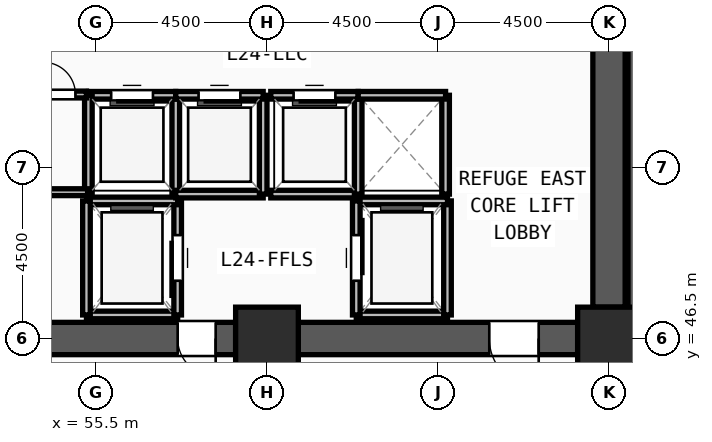
"""IFC4 building model, lengths in metres.
Left out: names, types, materials, properties, quantities, classifications, styles, units other than length and angle.
Written with IfcOpenShell. Run it as: python <this file> out.ifc"""

import sys

from ifc_helpers import new_model, si_unit, direction, frame, frame_2d, origin, origin_2d, place, context, subcontext, project, spatial, rectangle, extrude, source, transform, mapped, element, fill, save


model = new_model("IFC4")
c1 = context("Model", 3, precision=1e-05, world=origin(), true_north=direction((0.0, 1.0)))
c2 = subcontext(c1, "Body", "Model", "MODEL_VIEW")
j1 = project(units=[si_unit("LENGTHUNIT", "METRE"), si_unit("PLANEANGLEUNIT", "RADIAN")], contexts=[c1])
p1 = place(None, origin())
s1 = spatial("IfcSite", under=j1, at=p1, CompositionType="ELEMENT")
p2 = place(p1, origin())
s2 = spatial("IfcBuilding", under=s1, at=p2, CompositionType="ELEMENT")
p3 = place(p2, frame((0.0, 0.0, 93.0)))
s3 = spatial("IfcBuildingStorey", under=s2, at=p3, CompositionType="ELEMENT", Elevation=93.0)
m1 = source(origin(), c2, "Body", "SweptSolid", [
    extrude(rectangle(XDim=1.65, YDim=1.65, at=origin_2d()), origin(), (0.0, 0.0, 1.0), 4.5),
])
for number, where, z_axis, x_axis in (
    (1, (60.0, 46.5, 0.0), (0.0, 0.0, 1.0), (1.0, 0.0, 0.0)),
    (2, (69.0, 46.5, 0.0), (0.0, 0.0, 1.0), (1.0, 0.0, 0.0)),
):
    element("IfcColumn", number, at=place(p3, frame(where, z_axis=z_axis, x_axis=x_axis)), inside=s3, PredefinedType="COLUMN", context=c2, shape_type="MappedRepresentation", body=[
        mapped(m1, transform((0.0, 0.0, 0.0), x_axis=(1.0, 0.0, 0.0), y_axis=(0.0, 1.0, 0.0), z_axis=(0.0, 0.0, 1.0), scale=1.0)),
    ])
p4 = place(p3, frame((69.0, 60.675, 0.0), z_axis=(0.0, 0.0, 1.0), x_axis=(0.0, -1.0, 0.0)))
e3 = element("IfcWall", 3, at=p4, inside=s3, PredefinedType="SHEAR", context=c2, shape_type="SweptSolid", body=[
    extrude(rectangle(XDim=13.35, YDim=0.85, at=frame_2d((6.675, 0.0))), origin(), (0.0, 0.0, 1.0), 4.22),
])
m2 = source(origin(), c2, "Body", "SweptSolid", [
    extrude(rectangle(XDim=1.2, YDim=2.2, at=frame_2d((0.6, 1.1))), frame((0.0, 0.435, 0.0), z_axis=(0.0, -1.0, 0.0), x_axis=(1.0, 0.0, 0.0)), (0.0, 0.0, 1.0), 0.87),
])
p5 = place(p4, frame((1.125, 0.0, 0.0)))
e4 = element("IfcOpeningElement", 4, at=p5, cuts=e3, PredefinedType="OPENING", context=c2, shape_type="MappedRepresentation", body=[
    mapped(m2, transform((0.0, 0.0, 0.0), x_axis=(1.0, 0.0, 0.0), y_axis=(0.0, 1.0, 0.0), z_axis=(0.0, 0.0, 1.0), scale=1.0)),
])
p6 = place(p3, frame((68.175, 46.5, 0.0), z_axis=(0.0, 0.0, 1.0), x_axis=(-1.0, 0.0, 0.0)))
e5 = element("IfcWall", 5, at=p6, inside=s3, PredefinedType="SHEAR", context=c2, shape_type="SweptSolid", body=[
    extrude(rectangle(XDim=7.35, YDim=0.85, at=frame_2d((3.675, 0.0))), origin(), (0.0, 0.0, 1.0), 4.22),
])
m3 = source(origin(), c2, "Body", "SweptSolid", [
    extrude(rectangle(XDim=1.3, YDim=2.2, at=frame_2d((0.65, 1.1))), frame((0.0, 0.435, 0.0), z_axis=(0.0, -1.0, 0.0), x_axis=(1.0, 0.0, 0.0)), (0.0, 0.0, 1.0), 0.87),
])
p7 = place(p6, frame((1.025, 0.0, 0.0)))
e6 = element("IfcOpeningElement", 6, at=p7, cuts=e5, PredefinedType="OPENING", context=c2, shape_type="MappedRepresentation", body=[
    mapped(m3, transform((0.0, 0.0, 0.0), x_axis=(1.0, 0.0, 0.0), y_axis=(0.0, 1.0, 0.0), z_axis=(0.0, 0.0, 1.0), scale=1.0)),
])
p8 = place(p3, frame((59.175, 46.5, 0.0), z_axis=(0.0, 0.0, 1.0), x_axis=(-1.0, 0.0, 0.0)))
e7 = element("IfcWall", 7, at=p8, inside=s3, PredefinedType="SHEAR", context=c2, shape_type="SweptSolid", body=[
    extrude(rectangle(XDim=7.35, YDim=0.85, at=frame_2d((3.675, 0.0))), origin(), (0.0, 0.0, 1.0), 4.22),
])
p9 = place(p8, frame((5.025, 0.0, 0.0)))
e8 = element("IfcOpeningElement", 8, at=p9, cuts=e7, PredefinedType="OPENING", context=c2, shape_type="MappedRepresentation", body=[
    mapped(m3, transform((0.0, 0.0, 0.0), x_axis=(1.0, 0.0, 0.0), y_axis=(0.0, 1.0, 0.0), z_axis=(0.0, 0.0, 1.0), scale=1.0)),
])
m4 = source(origin(), c2, "Body", "SweptSolid", [
    extrude(rectangle(XDim=1.0, YDim=2.2, at=frame_2d((0.5, 1.1))), frame((0.0, 0.435, 0.0), z_axis=(0.0, -1.0, 0.0), x_axis=(1.0, 0.0, 0.0)), (0.0, 0.0, 1.0), 0.87),
])
p10 = place(p8, frame((0.525, 0.0, 0.0)))
e9 = element("IfcOpeningElement", 9, at=p10, cuts=e7, PredefinedType="OPENING", context=c2, shape_type="MappedRepresentation", body=[
    mapped(m4, transform((0.0, 0.0, 0.0), x_axis=(1.0, 0.0, 0.0), y_axis=(0.0, 1.0, 0.0), z_axis=(0.0, 0.0, 1.0), scale=1.0)),
])
p11 = place(p3, frame((69.62, 54.52, 0.0), z_axis=(0.0, 0.0, 1.0), x_axis=(0.0, -1.0, 0.0)))
e10 = element("IfcWall", 10, at=p11, inside=s3, PredefinedType="SOLIDWALL", context=c2, shape_type="SweptSolid", body=[
    extrude(rectangle(XDim=7.82, YDim=0.24, at=frame_2d((3.91, 0.0))), origin(), (0.0, 0.0, 1.0), 4.22),
])
p12 = place(p3, frame((55.25, 47.12, 0.0), z_axis=(0.0, 0.0, 1.0), x_axis=(1.0, 0.0, 0.0)))
e11 = element("IfcWall", 11, at=p12, inside=s3, PredefinedType="SOLIDWALL", context=c2, shape_type="SweptSolid", body=[
    extrude(rectangle(XDim=2.4, YDim=0.2, at=frame_2d((1.2, 0.0))), origin(), (0.0, 0.0, 1.0), 4.22),
])
p13 = place(p3, frame((57.65, 47.12, 0.0), z_axis=(0.0, 0.0, 1.0), x_axis=(0.0, 1.0, 0.0)))
e12 = element("IfcWall", 12, at=p13, inside=s3, PredefinedType="SOLIDWALL", context=c2, shape_type="SweptSolid", body=[
    extrude(rectangle(XDim=3.0, YDim=0.2, at=frame_2d((1.5, 0.0))), origin(), (0.0, 0.0, 1.0), 4.22),
])
m5 = source(origin(), c2, "Body", "SweptSolid", [
    extrude(rectangle(XDim=1.2, YDim=2.3, at=frame_2d((0.6, 1.15))), frame((0.0, 0.11, 0.0), z_axis=(0.0, -1.0, 0.0), x_axis=(1.0, 0.0, 0.0)), (0.0, 0.0, 1.0), 0.22),
])
p14 = place(p13, frame((0.9, 0.0, 0.0)))
e13 = element("IfcOpeningElement", 13, at=p14, cuts=e12, PredefinedType="OPENING", context=c2, shape_type="MappedRepresentation", body=[
    mapped(m5, transform((0.0, 0.0, 0.0), x_axis=(1.0, 0.0, 0.0), y_axis=(0.0, 1.0, 0.0), z_axis=(0.0, 0.0, 1.0), scale=1.0)),
])
p15 = place(p3, frame((57.65, 50.12, 0.0), z_axis=(0.0, 0.0, 1.0), x_axis=(-1.0, 0.0, 0.0)))
e14 = element("IfcWall", 14, at=p15, inside=s3, PredefinedType="SOLIDWALL", context=c2, shape_type="SweptSolid", body=[
    extrude(rectangle(XDim=2.4, YDim=0.2, at=frame_2d((1.2, 0.0))), origin(), (0.0, 0.0, 1.0), 4.22),
])
p16 = place(p3, frame((55.25, 50.12, 0.0), z_axis=(0.0, 0.0, 1.0), x_axis=(0.0, -1.0, 0.0)))
e15 = element("IfcWall", 15, at=p16, inside=s3, PredefinedType="SOLIDWALL", context=c2, shape_type="SweptSolid", body=[
    extrude(rectangle(XDim=3.0, YDim=0.2, at=frame_2d((1.5, 0.0))), origin(), (0.0, 0.0, 1.0), 4.22),
])
p17 = place(p3, frame((62.35, 47.12, 0.0), z_axis=(0.0, 0.0, 1.0), x_axis=(1.0, 0.0, 0.0)))
e16 = element("IfcWall", 16, at=p17, inside=s3, PredefinedType="SOLIDWALL", context=c2, shape_type="SweptSolid", body=[
    extrude(rectangle(XDim=2.4, YDim=0.2, at=frame_2d((1.2, 0.0))), origin(), (0.0, 0.0, 1.0), 4.22),
])
p18 = place(p3, frame((64.75, 47.12, 0.0), z_axis=(0.0, 0.0, 1.0), x_axis=(0.0, 1.0, 0.0)))
e17 = element("IfcWall", 17, at=p18, inside=s3, PredefinedType="SOLIDWALL", context=c2, shape_type="SweptSolid", body=[
    extrude(rectangle(XDim=3.0, YDim=0.2, at=frame_2d((1.5, 0.0))), origin(), (0.0, 0.0, 1.0), 4.22),
])
p19 = place(p3, frame((64.75, 50.12, 0.0), z_axis=(0.0, 0.0, 1.0), x_axis=(-1.0, 0.0, 0.0)))
e18 = element("IfcWall", 18, at=p19, inside=s3, PredefinedType="SOLIDWALL", context=c2, shape_type="SweptSolid", body=[
    extrude(rectangle(XDim=2.4, YDim=0.2, at=frame_2d((1.2, 0.0))), origin(), (0.0, 0.0, 1.0), 4.22),
])
p20 = place(p3, frame((62.35, 50.12, 0.0), z_axis=(0.0, 0.0, 1.0), x_axis=(0.0, -1.0, 0.0)))
e19 = element("IfcWall", 19, at=p20, inside=s3, PredefinedType="SOLIDWALL", context=c2, shape_type="SweptSolid", body=[
    extrude(rectangle(XDim=3.0, YDim=0.2, at=frame_2d((1.5, 0.0))), origin(), (0.0, 0.0, 1.0), 4.22),
])
p21 = place(p20, frame((0.9, 0.0, 0.0)))
e20 = element("IfcOpeningElement", 20, at=p21, cuts=e19, PredefinedType="OPENING", context=c2, shape_type="MappedRepresentation", body=[
    mapped(m5, transform((0.0, 0.0, 0.0), x_axis=(1.0, 0.0, 0.0), y_axis=(0.0, 1.0, 0.0), z_axis=(0.0, 0.0, 1.0), scale=1.0)),
])
p22 = place(p3, frame((57.6, 50.3, 0.0), z_axis=(0.0, 0.0, 1.0), x_axis=(0.0, 1.0, 0.0)))
e21 = element("IfcWall", 21, at=p22, inside=s3, PredefinedType="SOLIDWALL", context=c2, shape_type="SweptSolid", body=[
    extrude(rectangle(XDim=2.6, YDim=0.2, at=frame_2d((1.3, 0.0))), origin(), (0.0, 0.0, 1.0), 4.22),
])
p23 = place(p3, frame((57.6, 52.9, 0.0), z_axis=(0.0, 0.0, 1.0), x_axis=(-1.0, 0.0, 0.0)))
e22 = element("IfcWall", 22, at=p23, inside=s3, PredefinedType="SOLIDWALL", context=c2, shape_type="SweptSolid", body=[
    extrude(rectangle(XDim=2.3, YDim=0.2, at=frame_2d((1.15, 0.0))), origin(), (0.0, 0.0, 1.0), 4.22),
])
m6 = source(origin(), c2, "Body", "SweptSolid", [
    extrude(rectangle(XDim=1.1, YDim=2.2, at=frame_2d((0.55, 1.1))), frame((0.0, 0.11, 0.0), z_axis=(0.0, -1.0, 0.0), x_axis=(1.0, 0.0, 0.0)), (0.0, 0.0, 1.0), 0.22),
])
p24 = place(p23, frame((0.6, 0.0, 0.0)))
e23 = element("IfcOpeningElement", 23, at=p24, cuts=e22, PredefinedType="OPENING", context=c2, shape_type="MappedRepresentation", body=[
    mapped(m6, transform((0.0, 0.0, 0.0), x_axis=(1.0, 0.0, 0.0), y_axis=(0.0, 1.0, 0.0), z_axis=(0.0, 0.0, 1.0), scale=1.0)),
])
p25 = place(p3, frame((55.3, 52.9, 0.0), z_axis=(0.0, 0.0, 1.0), x_axis=(0.0, -1.0, 0.0)))
e24 = element("IfcWall", 24, at=p25, inside=s3, PredefinedType="SOLIDWALL", context=c2, shape_type="SweptSolid", body=[
    extrude(rectangle(XDim=2.6, YDim=0.2, at=frame_2d((1.3, 0.0))), origin(), (0.0, 0.0, 1.0), 4.22),
])
p26 = place(p3, frame((57.6, 50.3, 0.0), z_axis=(0.0, 0.0, 1.0), x_axis=(1.0, 0.0, 0.0)))
e25 = element("IfcWall", 25, at=p26, inside=s3, PredefinedType="SOLIDWALL", context=c2, shape_type="SweptSolid", body=[
    extrude(rectangle(XDim=2.3, YDim=0.2, at=frame_2d((1.15, 0.0))), origin(), (0.0, 0.0, 1.0), 4.22),
])
p27 = place(p3, frame((59.9, 50.3, 0.0), z_axis=(0.0, 0.0, 1.0), x_axis=(0.0, 1.0, 0.0)))
e26 = element("IfcWall", 26, at=p27, inside=s3, PredefinedType="SOLIDWALL", context=c2, shape_type="SweptSolid", body=[
    extrude(rectangle(XDim=2.6, YDim=0.2, at=frame_2d((1.3, 0.0))), origin(), (0.0, 0.0, 1.0), 4.22),
])
p28 = place(p3, frame((59.9, 52.9, 0.0), z_axis=(0.0, 0.0, 1.0), x_axis=(-1.0, 0.0, 0.0)))
e27 = element("IfcWall", 27, at=p28, inside=s3, PredefinedType="SOLIDWALL", context=c2, shape_type="SweptSolid", body=[
    extrude(rectangle(XDim=2.3, YDim=0.2, at=frame_2d((1.15, 0.0))), origin(), (0.0, 0.0, 1.0), 4.22),
])
p29 = place(p28, frame((0.6, 0.0, 0.0)))
e28 = element("IfcOpeningElement", 28, at=p29, cuts=e27, PredefinedType="OPENING", context=c2, shape_type="MappedRepresentation", body=[
    mapped(m6, transform((0.0, 0.0, 0.0), x_axis=(1.0, 0.0, 0.0), y_axis=(0.0, 1.0, 0.0), z_axis=(0.0, 0.0, 1.0), scale=1.0)),
])
p30 = place(p3, frame((60.1, 50.3, 0.0), z_axis=(0.0, 0.0, 1.0), x_axis=(1.0, 0.0, 0.0)))
e29 = element("IfcWall", 29, at=p30, inside=s3, PredefinedType="SOLIDWALL", context=c2, shape_type="SweptSolid", body=[
    extrude(rectangle(XDim=2.3, YDim=0.2, at=frame_2d((1.15, 0.0))), origin(), (0.0, 0.0, 1.0), 4.22),
])
p31 = place(p3, frame((62.4, 50.3, 0.0), z_axis=(0.0, 0.0, 1.0), x_axis=(0.0, 1.0, 0.0)))
e30 = element("IfcWall", 30, at=p31, inside=s3, PredefinedType="SOLIDWALL", context=c2, shape_type="SweptSolid", body=[
    extrude(rectangle(XDim=2.6, YDim=0.2, at=frame_2d((1.3, 0.0))), origin(), (0.0, 0.0, 1.0), 4.22),
])
p32 = place(p3, frame((62.4, 52.9, 0.0), z_axis=(0.0, 0.0, 1.0), x_axis=(-1.0, 0.0, 0.0)))
e31 = element("IfcWall", 31, at=p32, inside=s3, PredefinedType="SOLIDWALL", context=c2, shape_type="SweptSolid", body=[
    extrude(rectangle(XDim=2.3, YDim=0.2, at=frame_2d((1.15, 0.0))), origin(), (0.0, 0.0, 1.0), 4.22),
])
p33 = place(p32, frame((0.6, 0.0, 0.0)))
e32 = element("IfcOpeningElement", 32, at=p33, cuts=e31, PredefinedType="OPENING", context=c2, shape_type="MappedRepresentation", body=[
    mapped(m6, transform((0.0, 0.0, 0.0), x_axis=(1.0, 0.0, 0.0), y_axis=(0.0, 1.0, 0.0), z_axis=(0.0, 0.0, 1.0), scale=1.0)),
])
p34 = place(p3, frame((64.7, 50.3, 0.0), z_axis=(0.0, 0.0, 1.0), x_axis=(0.0, 1.0, 0.0)))
e33 = element("IfcWall", 33, at=p34, inside=s3, PredefinedType="SOLIDWALL", context=c2, shape_type="SweptSolid", body=[
    extrude(rectangle(XDim=2.6, YDim=0.2, at=frame_2d((1.3, 0.0))), origin(), (0.0, 0.0, 1.0), 4.22),
])
p35 = place(p3, frame((64.7, 52.9, 0.0), z_axis=(0.0, 0.0, 1.0), x_axis=(-1.0, 0.0, 0.0)))
e34 = element("IfcWall", 34, at=p35, inside=s3, PredefinedType="SOLIDWALL", context=c2, shape_type="SweptSolid", body=[
    extrude(rectangle(XDim=2.3, YDim=0.2, at=frame_2d((1.15, 0.0))), origin(), (0.0, 0.0, 1.0), 4.22),
])
p36 = place(p3, frame((53.82, 52.92, 0.0), z_axis=(0.0, 0.0, 1.0), x_axis=(1.0, 0.0, 0.0)))
e35 = element("IfcWall", 35, at=p36, inside=s3, PredefinedType="PARTITIONING", context=c2, shape_type="SweptSolid", body=[
    extrude(rectangle(XDim=1.43, YDim=0.18, at=frame_2d((0.715, 0.0))), origin(), (0.0, 0.0, 1.0), 4.22),
])
m7 = source(origin(), c2, "Body", "SweptSolid", [
    extrude(rectangle(XDim=0.85, YDim=2.1, at=frame_2d((0.425, 1.05))), frame((0.0, 0.1, 0.0), z_axis=(0.0, -1.0, 0.0), x_axis=(1.0, 0.0, 0.0)), (0.0, 0.0, 1.0), 0.2),
])
p37 = place(p36, frame((0.29, 0.0, 0.0)))
e36 = element("IfcOpeningElement", 36, at=p37, cuts=e35, PredefinedType="OPENING", context=c2, shape_type="MappedRepresentation", body=[
    mapped(m7, transform((0.0, 0.0, 0.0), x_axis=(1.0, 0.0, 0.0), y_axis=(0.0, 1.0, 0.0), z_axis=(0.0, 0.0, 1.0), scale=1.0)),
])
p38 = place(p3, frame((53.79, 50.35, 0.0), z_axis=(0.0, 0.0, 1.0), x_axis=(1.0, 0.0, 0.0)))
e37 = element("IfcWall", 37, at=p38, inside=s3, PredefinedType="PARTITIONING", context=c2, shape_type="SweptSolid", body=[
    extrude(rectangle(XDim=1.49, YDim=0.18, at=frame_2d((0.745, 0.0))), origin(), (0.0, 0.0, 1.0), 4.22),
])
m8 = source(origin(), c2, "Body", "SweptSolid", [
    extrude(rectangle(XDim=1.0, YDim=2.2, at=frame_2d((0.5, 1.1))), frame((0.0, 0.025, 0.0), z_axis=(0.0, -1.0, 0.0), x_axis=(1.0, 0.0, 0.0)), (0.0, 0.0, 1.0), 0.05),
])
p39 = place(p10, origin())
e38 = element("IfcDoor", 38, at=p39, inside=s3, OperationType="SINGLE_SWING_LEFT", PredefinedType="DOOR", context=c2, shape_type="MappedRepresentation", body=[
    mapped(m8, transform((0.0, 0.0, 0.0), x_axis=(1.0, 0.0, 0.0), y_axis=(0.0, 1.0, 0.0), z_axis=(0.0, 0.0, 1.0), scale=1.0)),
])
fill(e9, e38)
m9 = source(origin(), c2, "Body", "SweptSolid", [
    extrude(rectangle(XDim=1.3, YDim=2.2, at=frame_2d((0.65, 1.1))), frame((0.0, 0.025, 0.0), z_axis=(0.0, -1.0, 0.0), x_axis=(1.0, 0.0, 0.0)), (0.0, 0.0, 1.0), 0.05),
])
p40 = place(p7, origin())
e39 = element("IfcDoor", 39, at=p40, inside=s3, OperationType="SINGLE_SWING_LEFT", PredefinedType="DOOR", context=c2, shape_type="MappedRepresentation", body=[
    mapped(m9, transform((0.0, 0.0, 0.0), x_axis=(1.0, 0.0, 0.0), y_axis=(0.0, 1.0, 0.0), z_axis=(0.0, 0.0, 1.0), scale=1.0)),
])
fill(e6, e39)
m10 = source(origin(), c2, "Body", "SweptSolid", [
    extrude(rectangle(XDim=1.2, YDim=2.3, at=frame_2d((0.6, 1.15))), frame((0.0, 0.025, 0.0), z_axis=(0.0, -1.0, 0.0), x_axis=(1.0, 0.0, 0.0)), (0.0, 0.0, 1.0), 0.05),
])
p41 = place(p14, origin())
e40 = element("IfcDoor", 40, at=p41, inside=s3, OperationType="SLIDING_TO_LEFT", PredefinedType="DOOR", context=c2, shape_type="MappedRepresentation", body=[
    mapped(m10, transform((0.0, 0.0, 0.0), x_axis=(1.0, 0.0, 0.0), y_axis=(0.0, 1.0, 0.0), z_axis=(0.0, 0.0, 1.0), scale=1.0)),
])
fill(e13, e40)
p42 = place(p21, origin())
e41 = element("IfcDoor", 41, at=p42, inside=s3, OperationType="SLIDING_TO_LEFT", PredefinedType="DOOR", context=c2, shape_type="MappedRepresentation", body=[
    mapped(m10, transform((0.0, 0.0, 0.0), x_axis=(1.0, 0.0, 0.0), y_axis=(0.0, 1.0, 0.0), z_axis=(0.0, 0.0, 1.0), scale=1.0)),
])
fill(e20, e41)
m11 = source(origin(), c2, "Body", "SweptSolid", [
    extrude(rectangle(XDim=1.1, YDim=2.2, at=frame_2d((0.55, 1.1))), frame((0.0, 0.025, 0.0), z_axis=(0.0, -1.0, 0.0), x_axis=(1.0, 0.0, 0.0)), (0.0, 0.0, 1.0), 0.05),
])
p43 = place(p24, origin())
e42 = element("IfcDoor", 42, at=p43, inside=s3, OperationType="SLIDING_TO_LEFT", PredefinedType="DOOR", context=c2, shape_type="MappedRepresentation", body=[
    mapped(m11, transform((0.0, 0.0, 0.0), x_axis=(1.0, 0.0, 0.0), y_axis=(0.0, 1.0, 0.0), z_axis=(0.0, 0.0, 1.0), scale=1.0)),
])
fill(e23, e42)
p44 = place(p29, origin())
e43 = element("IfcDoor", 43, at=p44, inside=s3, OperationType="SLIDING_TO_LEFT", PredefinedType="DOOR", context=c2, shape_type="MappedRepresentation", body=[
    mapped(m11, transform((0.0, 0.0, 0.0), x_axis=(1.0, 0.0, 0.0), y_axis=(0.0, 1.0, 0.0), z_axis=(0.0, 0.0, 1.0), scale=1.0)),
])
fill(e28, e43)
p45 = place(p33, origin())
e44 = element("IfcDoor", 44, at=p45, inside=s3, OperationType="SLIDING_TO_LEFT", PredefinedType="DOOR", context=c2, shape_type="MappedRepresentation", body=[
    mapped(m11, transform((0.0, 0.0, 0.0), x_axis=(1.0, 0.0, 0.0), y_axis=(0.0, 1.0, 0.0), z_axis=(0.0, 0.0, 1.0), scale=1.0)),
])
fill(e32, e44)
m12 = source(origin(), c2, "Body", "SweptSolid", [
    extrude(rectangle(XDim=0.85, YDim=2.1, at=frame_2d((0.425, 1.05))), frame((0.0, 0.025, 0.0), z_axis=(0.0, -1.0, 0.0), x_axis=(1.0, 0.0, 0.0)), (0.0, 0.0, 1.0), 0.05),
])
p46 = place(p37, origin())
e45 = element("IfcDoor", 45, at=p46, inside=s3, OperationType="SINGLE_SWING_LEFT", PredefinedType="DOOR", context=c2, shape_type="MappedRepresentation", body=[
    mapped(m12, transform((0.0, 0.0, 0.0), x_axis=(1.0, 0.0, 0.0), y_axis=(0.0, 1.0, 0.0), z_axis=(0.0, 0.0, 1.0), scale=1.0)),
])
fill(e36, e45)
save(model, sys.argv[1])
